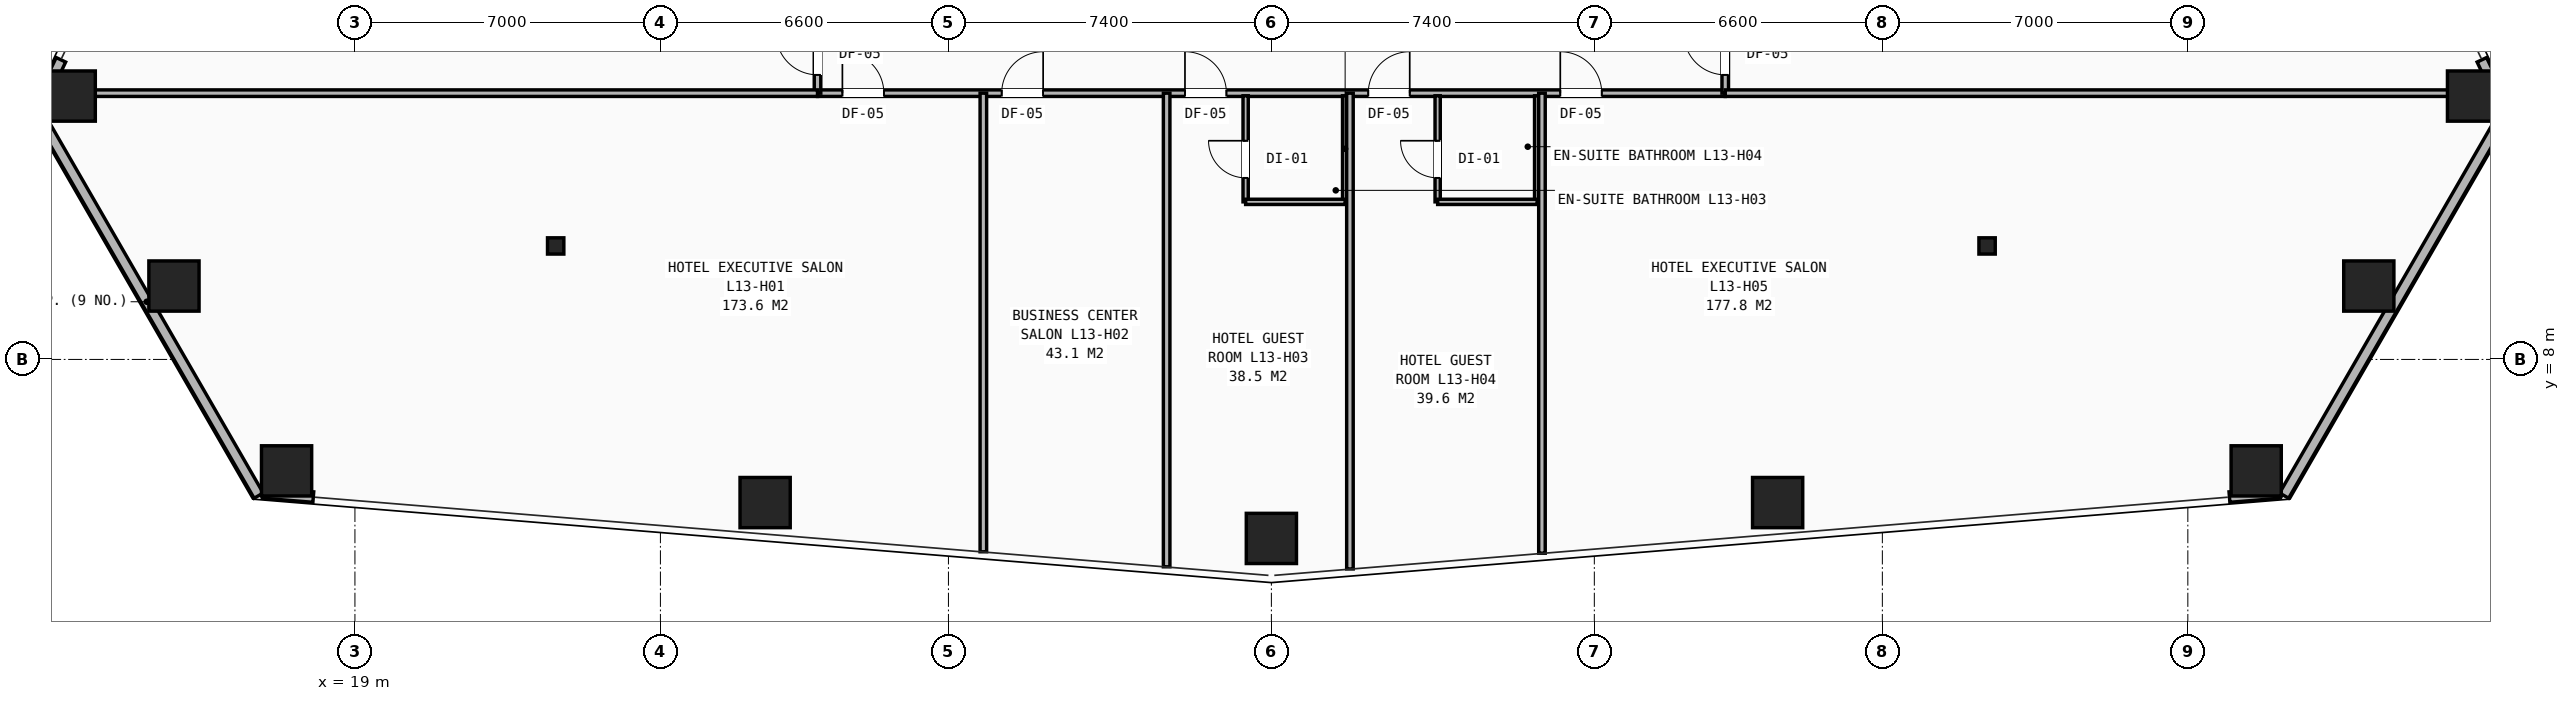
"""IFC4 building model, lengths in metres.
Left out: names, types, materials, properties, quantities, classifications, styles, units other than length and angle.
Written with IfcOpenShell. Run it as: python <this file> out.ifc"""

import sys

from ifc_helpers import new_model, si_unit, direction, frame, frame_2d, origin, origin_2d, place, context, subcontext, project, spatial, rectangle, hollow_rectangle, i_section, extrude, element, fill, save


model = new_model("IFC4")
c1 = context("Model", 3, precision=1e-05, world=origin(), true_north=direction((0.0, 1.0)))
c2 = subcontext(c1, "Body", "Model", "MODEL_VIEW")
j1 = project(units=[si_unit("LENGTHUNIT", "METRE"), si_unit("PLANEANGLEUNIT", "RADIAN")], contexts=[c1])
p1 = place(None, origin())
s1 = spatial("IfcSite", under=j1, at=p1, CompositionType="ELEMENT")
p2 = place(p1, origin())
s2 = spatial("IfcBuilding", under=s1, at=p2, CompositionType="ELEMENT")
p3 = place(p2, frame((0.0, 0.0, 49.6)))
s3 = spatial("IfcBuildingStorey", under=s2, at=p3, CompositionType="ELEMENT", Elevation=49.6)
for number, where, z_axis, x_axis in (
    (1, (23.6, 10.6, 0.0), (0.0, 0.0, 1.0), (1.0, 0.0, 0.0)),
    (2, (56.4, 10.6, 0.0), (0.0, 0.0, 1.0), (1.0, 0.0, 0.0)),
):
    element("IfcColumn", number, at=place(p3, frame(where, z_axis=z_axis, x_axis=x_axis)), inside=s3, PredefinedType="COLUMN", context=c2, shape_type="SweptSolid", body=[
        extrude(i_section(OverallWidth=0.374, OverallDepth=0.372, WebThickness=0.016, FlangeThickness=0.026, at=origin_2d()), origin(), (0.0, 0.0, 1.0), 3.2),
    ])
for number, where, z_axis, x_axis in (
    (3, (12.476, 14.033, 0.0), (0.0, 0.0, 1.0), (1.0, 0.0, 0.0)),
    (4, (14.853, 9.681, 0.0), (0.0, 0.0, 1.0), (1.0, 0.0, 0.0)),
    (5, (17.434, 5.447, 0.0), (0.0, 0.0, 1.0), (1.0, 0.0, 0.0)),
    (6, (28.399, 4.721, 0.0), (0.0, 0.0, 1.0), (1.0, 0.0, 0.0)),
    (7, (40.0, 3.899, 0.0), (0.0, 0.0, 1.0), (1.0, 0.0, 0.0)),
    (8, (51.601, 4.721, 0.0), (0.0, 0.0, 1.0), (1.0, 0.0, 0.0)),
    (9, (62.566, 5.447, 0.0), (0.0, 0.0, 1.0), (1.0, 0.0, 0.0)),
    (10, (65.147, 9.681, 0.0), (0.0, 0.0, 1.0), (1.0, 0.0, 0.0)),
    (11, (67.524, 14.033, 0.0), (0.0, 0.0, 1.0), (1.0, 0.0, 0.0)),
):
    element("IfcColumn", number, at=place(p3, frame(where, z_axis=z_axis, x_axis=x_axis)), inside=s3, PredefinedType="COLUMN", context=c2, shape_type="SweptSolid", body=[
        extrude(hollow_rectangle(XDim=1.15, YDim=1.15, WallThickness=0.075, at=origin_2d()), origin(), (0.0, 0.0, 1.0), 3.2),
    ])
p4 = place(p3, frame((12.263, 14.864, 0.0), z_axis=(0.0, 0.0, 1.0), x_axis=(-0.42778841273, -0.903878904463, 0.0)))
e12 = element("IfcWall", 12, at=p4, inside=s3, PredefinedType="SHEAR", context=c2, shape_type="SweptSolid", body=[
    extrude(rectangle(XDim=1.163, YDim=0.24, at=frame_2d((0.581, 0.0))), origin(), (0.0, 0.0, 1.0), 2.263),
])
p5 = place(p3, frame((16.794, 4.88, 0.0), z_axis=(0.0, 0.0, 1.0), x_axis=(-0.50000197177, 0.86602426538, 0.0)))
e13 = element("IfcWall", 13, at=p5, inside=s3, PredefinedType="SHEAR", context=c2, shape_type="SweptSolid", body=[
    extrude(rectangle(XDim=10.257, YDim=0.24, at=frame_2d((5.129, 0.0))), origin(), (0.0, 0.0, 1.0), 2.263),
])
for number, where, z_axis, x_axis in (
    (14, (16.888, 4.941, 0.0), (0.0, 0.0, 1.0), (0.997, -0.081, 0.0)),
    (15, (61.954, 4.847, 0.0), (0.0, 0.0, 1.0), (0.997, 0.081, 0.0)),
):
    element("IfcWall", number, at=place(p3, frame(where, z_axis=z_axis, x_axis=x_axis)), inside=s3, PredefinedType="SHEAR", context=c2, shape_type="SweptSolid", body=[
        extrude(rectangle(XDim=1.162, YDim=0.24, at=frame_2d((0.581, 0.0))), origin(), (0.0, 0.0, 1.0), 2.263),
    ])
p6 = place(p3, frame((68.335, 13.763, 0.0), z_axis=(0.0, 0.0, 1.0), x_axis=(-0.50000197177, -0.86602426538, 0.0)))
e16 = element("IfcWall", 16, at=p6, inside=s3, PredefinedType="SHEAR", context=c2, shape_type="SweptSolid", body=[
    extrude(rectangle(XDim=10.257, YDim=0.24, at=frame_2d((5.129, 0.0))), origin(), (0.0, 0.0, 1.0), 2.263),
])
p7 = place(p3, frame((68.235, 13.813, 0.0), z_axis=(0.0, 0.0, 1.0), x_axis=(-0.42778841273, 0.903878904463, 0.0)))
e17 = element("IfcWall", 17, at=p7, inside=s3, PredefinedType="SHEAR", context=c2, shape_type="SweptSolid", body=[
    extrude(rectangle(XDim=1.163, YDim=0.24, at=frame_2d((0.581, 0.0))), origin(), (0.0, 0.0, 1.0), 2.263),
])
p8 = place(p3, frame((29.6, 14.1, 0.0), z_axis=(0.0, 0.0, 1.0), x_axis=(1.0, 0.0, 0.0)))
e18 = element("IfcWall", 18, at=p8, inside=s3, PredefinedType="PARTITIONING", context=c2, shape_type="SweptSolid", body=[
    extrude(rectangle(XDim=20.8, YDim=0.15, at=frame_2d((10.4, 0.0))), origin(), (0.0, 0.0, 1.0), 2.431),
])
p9 = place(p8, frame((0.57, 0.0, 0.0)))
e19 = element("IfcOpeningElement", 19, at=p9, cuts=e18, PredefinedType="OPENING", context=c2, shape_type="SweptSolid", body=[
    extrude(rectangle(XDim=0.95, YDim=2.1, at=frame_2d((0.475, 1.05))), frame((0.0, 0.085, 0.0), z_axis=(0.0, -1.0, 0.0), x_axis=(1.0, 0.0, 0.0)), (0.0, 0.0, 1.0), 0.17),
])
p10 = place(p8, frame((4.22, 0.0, 0.0)))
e20 = element("IfcOpeningElement", 20, at=p10, cuts=e18, PredefinedType="OPENING", context=c2, shape_type="SweptSolid", body=[
    extrude(rectangle(XDim=0.95, YDim=2.1, at=frame_2d((0.475, 1.05))), frame((0.0, 0.085, 0.0), z_axis=(0.0, -1.0, 0.0), x_axis=(1.0, 0.0, 0.0)), (0.0, 0.0, 1.0), 0.17),
])
p11 = place(p8, frame((8.42, 0.0, 0.0)))
e21 = element("IfcOpeningElement", 21, at=p11, cuts=e18, PredefinedType="OPENING", context=c2, shape_type="SweptSolid", body=[
    extrude(rectangle(XDim=0.95, YDim=2.1, at=frame_2d((0.475, 1.05))), frame((0.0, 0.085, 0.0), z_axis=(0.0, -1.0, 0.0), x_axis=(1.0, 0.0, 0.0)), (0.0, 0.0, 1.0), 0.17),
])
p12 = place(p8, frame((12.62, 0.0, 0.0)))
e22 = element("IfcOpeningElement", 22, at=p12, cuts=e18, PredefinedType="OPENING", context=c2, shape_type="SweptSolid", body=[
    extrude(rectangle(XDim=0.95, YDim=2.1, at=frame_2d((0.475, 1.05))), frame((0.0, 0.085, 0.0), z_axis=(0.0, -1.0, 0.0), x_axis=(1.0, 0.0, 0.0)), (0.0, 0.0, 1.0), 0.17),
])
p13 = place(p8, frame((17.02, 0.0, 0.0)))
e23 = element("IfcOpeningElement", 23, at=p13, cuts=e18, PredefinedType="OPENING", context=c2, shape_type="SweptSolid", body=[
    extrude(rectangle(XDim=0.95, YDim=2.1, at=frame_2d((0.475, 1.05))), frame((0.0, 0.085, 0.0), z_axis=(0.0, -1.0, 0.0), x_axis=(1.0, 0.0, 0.0)), (0.0, 0.0, 1.0), 0.17),
])
p14 = place(p3, frame((29.6, 14.1, 0.0), z_axis=(0.0, 0.0, 1.0), x_axis=(0.0, 1.0, 0.0)))
e24 = element("IfcWall", 24, at=p14, inside=s3, PredefinedType="PARTITIONING", context=c2, shape_type="SweptSolid", body=[
    extrude(rectangle(XDim=21.9, YDim=0.15, at=frame_2d((10.95, 0.0))), origin(), (0.0, 0.0, 1.0), 2.431),
])
p15 = place(p14, frame((0.42, 0.0, 0.0)))
e25 = element("IfcOpeningElement", 25, at=p15, cuts=e24, PredefinedType="OPENING", context=c2, shape_type="SweptSolid", body=[
    extrude(rectangle(XDim=0.95, YDim=2.1, at=frame_2d((0.475, 1.05))), frame((0.0, 0.085, 0.0), z_axis=(0.0, -1.0, 0.0), x_axis=(1.0, 0.0, 0.0)), (0.0, 0.0, 1.0), 0.17),
])
p16 = place(p14, frame((5.12, 0.0, 0.0)))
e26 = element("IfcOpeningElement", 26, at=p16, cuts=e24, PredefinedType="OPENING", context=c2, shape_type="SweptSolid", body=[
    extrude(rectangle(XDim=0.95, YDim=2.1, at=frame_2d((0.475, 1.05))), frame((0.0, 0.085, 0.0), z_axis=(0.0, -1.0, 0.0), x_axis=(1.0, 0.0, 0.0)), (0.0, 0.0, 1.0), 0.17),
])
p17 = place(p14, frame((10.12, 0.0, 0.0)))
e27 = element("IfcOpeningElement", 27, at=p17, cuts=e24, PredefinedType="OPENING", context=c2, shape_type="SweptSolid", body=[
    extrude(rectangle(XDim=0.95, YDim=2.1, at=frame_2d((0.475, 1.05))), frame((0.0, 0.085, 0.0), z_axis=(0.0, -1.0, 0.0), x_axis=(1.0, 0.0, 0.0)), (0.0, 0.0, 1.0), 0.17),
])
p18 = place(p14, frame((16.12, 0.0, 0.0)))
e28 = element("IfcOpeningElement", 28, at=p18, cuts=e24, PredefinedType="OPENING", context=c2, shape_type="SweptSolid", body=[
    extrude(rectangle(XDim=0.95, YDim=2.1, at=frame_2d((0.475, 1.05))), frame((0.0, 0.085, 0.0), z_axis=(0.0, -1.0, 0.0), x_axis=(1.0, 0.0, 0.0)), (0.0, 0.0, 1.0), 0.17),
])
p19 = place(p3, frame((50.4, 14.1, 0.0), z_axis=(0.0, 0.0, 1.0), x_axis=(0.0, 1.0, 0.0)))
e29 = element("IfcWall", 29, at=p19, inside=s3, PredefinedType="PARTITIONING", context=c2, shape_type="SweptSolid", body=[
    extrude(rectangle(XDim=21.9, YDim=0.15, at=frame_2d((10.95, 0.0))), origin(), (0.0, 0.0, 1.0), 2.431),
])
p20 = place(p19, frame((0.42, 0.0, 0.0)))
e30 = element("IfcOpeningElement", 30, at=p20, cuts=e29, PredefinedType="OPENING", context=c2, shape_type="SweptSolid", body=[
    extrude(rectangle(XDim=0.95, YDim=2.1, at=frame_2d((0.475, 1.05))), frame((0.0, 0.085, 0.0), z_axis=(0.0, -1.0, 0.0), x_axis=(1.0, 0.0, 0.0)), (0.0, 0.0, 1.0), 0.17),
])
p21 = place(p19, frame((5.72, 0.0, 0.0)))
e31 = element("IfcOpeningElement", 31, at=p21, cuts=e29, PredefinedType="OPENING", context=c2, shape_type="SweptSolid", body=[
    extrude(rectangle(XDim=0.95, YDim=2.1, at=frame_2d((0.475, 1.05))), frame((0.0, 0.085, 0.0), z_axis=(0.0, -1.0, 0.0), x_axis=(1.0, 0.0, 0.0)), (0.0, 0.0, 1.0), 0.17),
])
p22 = place(p19, frame((11.12, 0.0, 0.0)))
e32 = element("IfcOpeningElement", 32, at=p22, cuts=e29, PredefinedType="OPENING", context=c2, shape_type="SweptSolid", body=[
    extrude(rectangle(XDim=0.95, YDim=2.1, at=frame_2d((0.475, 1.05))), frame((0.0, 0.085, 0.0), z_axis=(0.0, -1.0, 0.0), x_axis=(1.0, 0.0, 0.0)), (0.0, 0.0, 1.0), 0.17),
])
p23 = place(p19, frame((16.72, 0.0, 0.0)))
e33 = element("IfcOpeningElement", 33, at=p23, cuts=e29, PredefinedType="OPENING", context=c2, shape_type="SweptSolid", body=[
    extrude(rectangle(XDim=0.95, YDim=2.1, at=frame_2d((0.475, 1.05))), frame((0.0, 0.085, 0.0), z_axis=(0.0, -1.0, 0.0), x_axis=(1.0, 0.0, 0.0)), (0.0, 0.0, 1.0), 0.17),
])
p24 = place(p3, frame((33.4, 3.594, 0.0), z_axis=(0.0, 0.0, 1.0), x_axis=(0.0, 1.0, 0.0)))
e34 = element("IfcWall", 34, at=p24, inside=s3, PredefinedType="PARTITIONING", context=c2, shape_type="SweptSolid", body=[
    extrude(rectangle(XDim=10.507, YDim=0.15, at=frame_2d((5.253, 0.0))), origin(), (0.0, 0.0, 1.0), 2.268),
])
p25 = place(p3, frame((37.6, 3.25, 0.0), z_axis=(0.0, 0.0, 1.0), x_axis=(0.0, 1.0, 0.0)))
e35 = element("IfcWall", 35, at=p25, inside=s3, PredefinedType="PARTITIONING", context=c2, shape_type="SweptSolid", body=[
    extrude(rectangle(XDim=10.851, YDim=0.15, at=frame_2d((5.425, 0.0))), origin(), (0.0, 0.0, 1.0), 2.268),
])
p26 = place(p3, frame((39.41, 11.61, 0.0), z_axis=(0.0, 0.0, 1.0), x_axis=(0.0, 1.0, 0.0)))
e36 = element("IfcWall", 36, at=p26, inside=s3, PredefinedType="PARTITIONING", context=c2, shape_type="SweptSolid", body=[
    extrude(rectangle(XDim=2.43, YDim=0.12, at=frame_2d((1.215, 0.0))), origin(), (0.0, 0.0, 1.0), 2.98),
])
p27 = place(p26, frame((0.55, 0.0, 0.0)))
e37 = element("IfcOpeningElement", 37, at=p27, cuts=e36, PredefinedType="OPENING", context=c2, shape_type="SweptSolid", body=[
    extrude(rectangle(XDim=0.85, YDim=2.05, at=frame_2d((0.425, 1.025))), frame((0.0, 0.07, 0.0), z_axis=(0.0, -1.0, 0.0), x_axis=(1.0, 0.0, 0.0)), (0.0, 0.0, 1.0), 0.14),
])
p28 = place(p3, frame((41.69, 11.61, 0.0), z_axis=(0.0, 0.0, 1.0), x_axis=(0.0, 1.0, 0.0)))
e38 = element("IfcWall", 38, at=p28, inside=s3, PredefinedType="PARTITIONING", context=c2, shape_type="SweptSolid", body=[
    extrude(rectangle(XDim=2.43, YDim=0.12, at=frame_2d((1.215, 0.0))), origin(), (0.0, 0.0, 1.0), 2.98),
])
p29 = place(p3, frame((39.41, 11.61, 0.0), z_axis=(0.0, 0.0, 1.0), x_axis=(1.0, 0.0, 0.0)))
e39 = element("IfcWall", 39, at=p29, inside=s3, PredefinedType="PARTITIONING", context=c2, shape_type="SweptSolid", body=[
    extrude(rectangle(XDim=2.28, YDim=0.12, at=frame_2d((1.14, 0.0))), origin(), (0.0, 0.0, 1.0), 2.98),
])
p30 = place(p3, frame((41.8, 3.2, 0.0), z_axis=(0.0, 0.0, 1.0), x_axis=(0.0, 1.0, 0.0)))
e40 = element("IfcWall", 40, at=p30, inside=s3, PredefinedType="PARTITIONING", context=c2, shape_type="SweptSolid", body=[
    extrude(rectangle(XDim=10.9, YDim=0.15, at=frame_2d((5.45, 0.0))), origin(), (0.0, 0.0, 1.0), 2.268),
])
p31 = place(p3, frame((43.81, 11.61, 0.0), z_axis=(0.0, 0.0, 1.0), x_axis=(0.0, 1.0, 0.0)))
e41 = element("IfcWall", 41, at=p31, inside=s3, PredefinedType="PARTITIONING", context=c2, shape_type="SweptSolid", body=[
    extrude(rectangle(XDim=2.43, YDim=0.12, at=frame_2d((1.215, 0.0))), origin(), (0.0, 0.0, 1.0), 2.98),
])
p32 = place(p31, frame((0.55, 0.0, 0.0)))
e42 = element("IfcOpeningElement", 42, at=p32, cuts=e41, PredefinedType="OPENING", context=c2, shape_type="SweptSolid", body=[
    extrude(rectangle(XDim=0.85, YDim=2.05, at=frame_2d((0.425, 1.025))), frame((0.0, 0.07, 0.0), z_axis=(0.0, -1.0, 0.0), x_axis=(1.0, 0.0, 0.0)), (0.0, 0.0, 1.0), 0.14),
])
p33 = place(p3, frame((46.09, 11.61, 0.0), z_axis=(0.0, 0.0, 1.0), x_axis=(0.0, 1.0, 0.0)))
e43 = element("IfcWall", 43, at=p33, inside=s3, PredefinedType="PARTITIONING", context=c2, shape_type="SweptSolid", body=[
    extrude(rectangle(XDim=2.43, YDim=0.12, at=frame_2d((1.215, 0.0))), origin(), (0.0, 0.0, 1.0), 2.98),
])
p34 = place(p3, frame((43.81, 11.61, 0.0), z_axis=(0.0, 0.0, 1.0), x_axis=(1.0, 0.0, 0.0)))
e44 = element("IfcWall", 44, at=p34, inside=s3, PredefinedType="PARTITIONING", context=c2, shape_type="SweptSolid", body=[
    extrude(rectangle(XDim=2.28, YDim=0.12, at=frame_2d((1.14, 0.0))), origin(), (0.0, 0.0, 1.0), 2.98),
])
p35 = place(p3, frame((46.2, 3.561, 0.0), z_axis=(0.0, 0.0, 1.0), x_axis=(0.0, 1.0, 0.0)))
e45 = element("IfcWall", 45, at=p35, inside=s3, PredefinedType="PARTITIONING", context=c2, shape_type="SweptSolid", body=[
    extrude(rectangle(XDim=10.539, YDim=0.15, at=frame_2d((5.27, 0.0))), origin(), (0.0, 0.0, 1.0), 2.268),
])
for number, where, z_axis, x_axis in (
    (46, (11.906, 14.1, 0.0), (0.0, 0.0, 1.0), (1.0, 0.0, 0.0)),
    (47, (50.4, 14.1, 0.0), (0.0, 0.0, 1.0), (1.0, 0.0, 0.0)),
):
    element("IfcWall", number, at=place(p3, frame(where, z_axis=z_axis, x_axis=x_axis)), inside=s3, PredefinedType="PARTITIONING", context=c2, shape_type="SweptSolid", body=[
        extrude(rectangle(XDim=17.694, YDim=0.15, at=frame_2d((8.847, 0.0))), origin(), (0.0, 0.0, 1.0), 2.268),
    ])
p36 = place(p9, origin())
e48 = element("IfcDoor", 48, at=p36, inside=s3, OperationType="SINGLE_SWING_LEFT", PredefinedType="DOOR", context=c2, shape_type="SweptSolid", body=[
    extrude(rectangle(XDim=0.95, YDim=2.1, at=frame_2d((0.475, 1.05))), frame((0.0, 0.025, 0.0), z_axis=(0.0, -1.0, 0.0), x_axis=(1.0, 0.0, 0.0)), (0.0, 0.0, 1.0), 0.05),
])
fill(e19, e48)
p37 = place(p10, origin())
e49 = element("IfcDoor", 49, at=p37, inside=s3, OperationType="SINGLE_SWING_RIGHT", PredefinedType="DOOR", context=c2, shape_type="SweptSolid", body=[
    extrude(rectangle(XDim=0.95, YDim=2.1, at=frame_2d((0.475, 1.05))), frame((0.0, 0.025, 0.0), z_axis=(0.0, -1.0, 0.0), x_axis=(1.0, 0.0, 0.0)), (0.0, 0.0, 1.0), 0.05),
])
fill(e20, e49)
p38 = place(p11, origin())
e50 = element("IfcDoor", 50, at=p38, inside=s3, OperationType="SINGLE_SWING_LEFT", PredefinedType="DOOR", context=c2, shape_type="SweptSolid", body=[
    extrude(rectangle(XDim=0.95, YDim=2.1, at=frame_2d((0.475, 1.05))), frame((0.0, 0.025, 0.0), z_axis=(0.0, -1.0, 0.0), x_axis=(1.0, 0.0, 0.0)), (0.0, 0.0, 1.0), 0.05),
])
fill(e21, e50)
p39 = place(p27, origin())
e51 = element("IfcDoor", 51, at=p39, inside=s3, OperationType="SINGLE_SWING_RIGHT", PredefinedType="DOOR", context=c2, shape_type="SweptSolid", body=[
    extrude(rectangle(XDim=0.85, YDim=2.05, at=frame_2d((0.425, 1.025))), frame((0.0, 0.025, 0.0), z_axis=(0.0, -1.0, 0.0), x_axis=(1.0, 0.0, 0.0)), (0.0, 0.0, 1.0), 0.05),
])
fill(e37, e51)
p40 = place(p12, origin())
e52 = element("IfcDoor", 52, at=p40, inside=s3, OperationType="SINGLE_SWING_RIGHT", PredefinedType="DOOR", context=c2, shape_type="SweptSolid", body=[
    extrude(rectangle(XDim=0.95, YDim=2.1, at=frame_2d((0.475, 1.05))), frame((0.0, 0.025, 0.0), z_axis=(0.0, -1.0, 0.0), x_axis=(1.0, 0.0, 0.0)), (0.0, 0.0, 1.0), 0.05),
])
fill(e22, e52)
p41 = place(p32, origin())
e53 = element("IfcDoor", 53, at=p41, inside=s3, OperationType="SINGLE_SWING_RIGHT", PredefinedType="DOOR", context=c2, shape_type="SweptSolid", body=[
    extrude(rectangle(XDim=0.85, YDim=2.05, at=frame_2d((0.425, 1.025))), frame((0.0, 0.025, 0.0), z_axis=(0.0, -1.0, 0.0), x_axis=(1.0, 0.0, 0.0)), (0.0, 0.0, 1.0), 0.05),
])
fill(e42, e53)
p42 = place(p13, origin())
e54 = element("IfcDoor", 54, at=p42, inside=s3, OperationType="SINGLE_SWING_LEFT", PredefinedType="DOOR", context=c2, shape_type="SweptSolid", body=[
    extrude(rectangle(XDim=0.95, YDim=2.1, at=frame_2d((0.475, 1.05))), frame((0.0, 0.025, 0.0), z_axis=(0.0, -1.0, 0.0), x_axis=(1.0, 0.0, 0.0)), (0.0, 0.0, 1.0), 0.05),
])
fill(e23, e54)
p43 = place(p15, origin())
e55 = element("IfcDoor", 55, at=p43, inside=s3, OperationType="SINGLE_SWING_RIGHT", PredefinedType="DOOR", context=c2, shape_type="SweptSolid", body=[
    extrude(rectangle(XDim=0.95, YDim=2.1, at=frame_2d((0.475, 1.05))), frame((0.0, 0.025, 0.0), z_axis=(0.0, -1.0, 0.0), x_axis=(1.0, 0.0, 0.0)), (0.0, 0.0, 1.0), 0.05),
])
fill(e25, e55)
p44 = place(p20, origin())
e56 = element("IfcDoor", 56, at=p44, inside=s3, OperationType="SINGLE_SWING_RIGHT", PredefinedType="DOOR", context=c2, shape_type="SweptSolid", body=[
    extrude(rectangle(XDim=0.95, YDim=2.1, at=frame_2d((0.475, 1.05))), frame((0.0, 0.025, 0.0), z_axis=(0.0, -1.0, 0.0), x_axis=(1.0, 0.0, 0.0)), (0.0, 0.0, 1.0), 0.05),
])
fill(e30, e56)
save(model, sys.argv[1])
